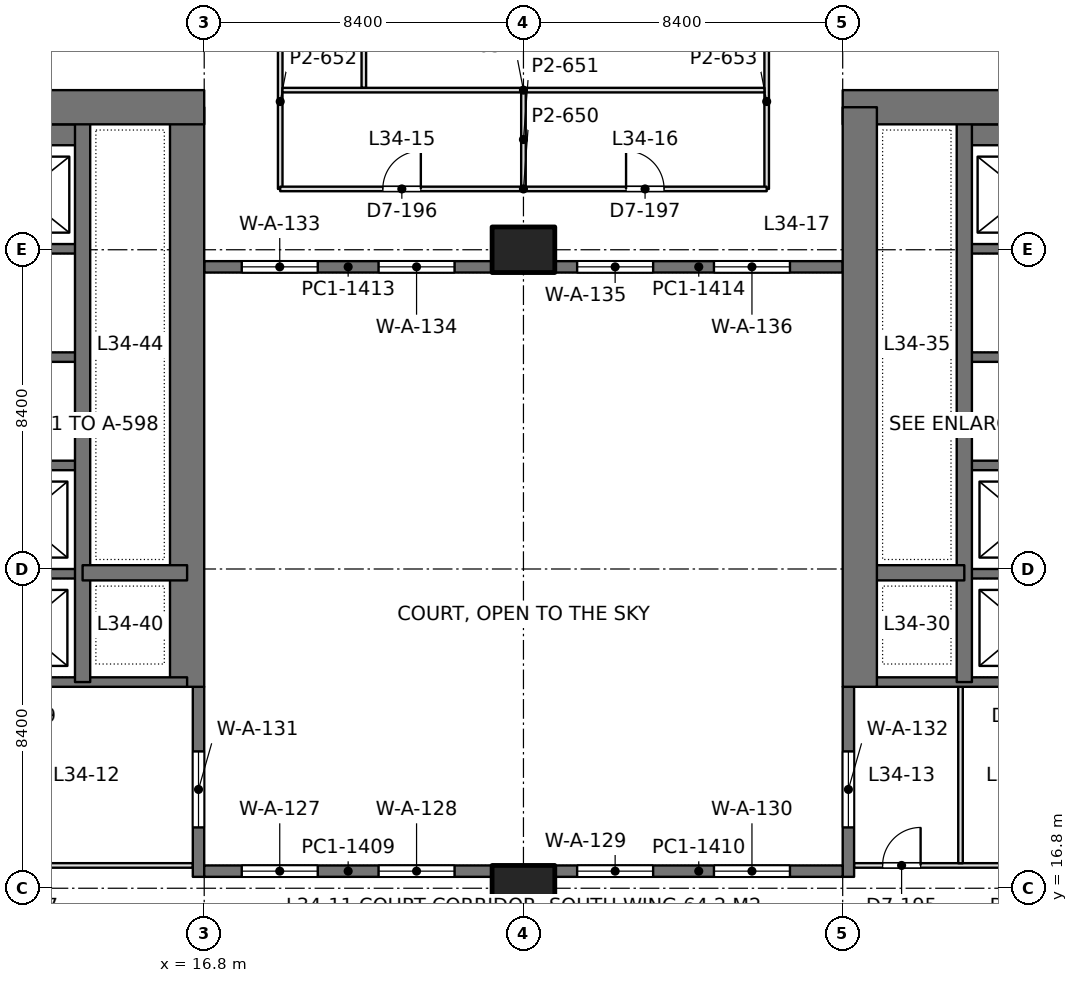
"""IFC4 building model, lengths in metres.
Left out: names, types, materials, properties, quantities, classifications, styles, units other than length and angle.
Written with IfcOpenShell. Run it as: python <this file> out.ifc"""

import sys

from ifc_helpers import new_model, si_unit, direction, frame, frame_2d, origin, origin_2d, place, context, subcontext, project, spatial, rectangle, extrude, element, fill, save


model = new_model("IFC4")
c1 = context("Model", 3, precision=1e-05, world=origin(), true_north=direction((0.0, 1.0)))
c2 = subcontext(c1, "Body", "Model", "MODEL_VIEW")
j1 = project(units=[si_unit("LENGTHUNIT", "METRE"), si_unit("PLANEANGLEUNIT", "RADIAN")], contexts=[c1])
p1 = place(None, origin())
s1 = spatial("IfcSite", under=j1, at=p1, CompositionType="ELEMENT")
p2 = place(p1, origin())
s2 = spatial("IfcBuilding", under=s1, at=p2, CompositionType="ELEMENT")
p3 = place(p2, frame((0.0, 0.0, 151.2)))
s3 = spatial("IfcBuildingStorey", under=s2, at=p3, CompositionType="ELEMENT", Elevation=151.2)
for number, where, z_axis, x_axis in (
    (1, (25.2, 16.8, 0.0), (0.0, 0.0, 1.0), (1.0, 0.0, 0.0)),
    (2, (25.2, 33.6, 0.0), (0.0, 0.0, 1.0), (1.0, 0.0, 0.0)),
):
    element("IfcColumn", number, at=place(p3, frame(where, z_axis=z_axis, x_axis=x_axis)), inside=s3, PredefinedType="COLUMN", context=c2, shape_type="SweptSolid", body=[
        extrude(rectangle(XDim=1.65, YDim=1.2, at=origin_2d()), origin(), (0.0, 0.0, 1.0), 4.2),
    ])
p4 = place(p3, frame((-1.2, 37.35, 0.0), z_axis=(0.0, 0.0, 1.0), x_axis=(1.0, 0.0, 0.0)))
e3 = element("IfcWall", 3, at=p4, inside=s3, PredefinedType="SHEAR", context=c2, shape_type="SweptSolid", body=[
    extrude(rectangle(XDim=18.0, YDim=0.9, at=frame_2d((9.0, 0.0))), origin(), (0.0, 0.0, 1.0), 4.2),
])
p5 = place(p4, frame((8.95, 0.0, 0.0)))
e4 = element("IfcOpeningElement", 4, at=p5, cuts=e3, PredefinedType="OPENING", context=c2, shape_type="SweptSolid", body=[
    extrude(rectangle(XDim=1.8, YDim=2.4, at=frame_2d((0.9, 1.2))), frame((0.0, 0.46, 0.0), z_axis=(0.0, -1.0, 0.0), x_axis=(1.0, 0.0, 0.0)), (0.0, 0.0, 1.0), 0.92),
])
p6 = place(p3, frame((16.35, 22.1, 0.0), z_axis=(0.0, 0.0, 1.0), x_axis=(0.0, 1.0, 0.0)))
e5 = element("IfcWall", 5, at=p6, inside=s3, PredefinedType="SHEAR", context=c2, shape_type="SweptSolid", body=[
    extrude(rectangle(XDim=15.25, YDim=0.9, at=frame_2d((7.625, 0.0))), origin(), (0.0, 0.0, 1.0), 4.2),
])
p7 = place(p3, frame((13.6, 22.225, 0.0), z_axis=(0.0, 0.0, 1.0), x_axis=(0.0, 1.0, 0.0)))
e6 = element("IfcWall", 6, at=p7, inside=s3, PredefinedType="SHEAR", context=c2, shape_type="SweptSolid", body=[
    extrude(rectangle(XDim=15.125, YDim=0.4, at=frame_2d((7.562, 0.0))), origin(), (0.0, 0.0, 1.0), 4.2),
])
p8 = place(p3, frame((13.6, 25.1, 0.0), z_axis=(0.0, 0.0, 1.0), x_axis=(1.0, 0.0, 0.0)))
e7 = element("IfcWall", 7, at=p8, inside=s3, PredefinedType="SHEAR", context=c2, shape_type="SweptSolid", body=[
    extrude(rectangle(XDim=2.75, YDim=0.4, at=frame_2d((1.375, 0.0))), origin(), (0.0, 0.0, 1.0), 4.2),
])
p9 = place(p3, frame((10.4, 22.225, 0.0), z_axis=(0.0, 0.0, 1.0), x_axis=(1.0, 0.0, 0.0)))
e8 = element("IfcWall", 8, at=p9, inside=s3, PredefinedType="SHEAR", context=c2, shape_type="SweptSolid", body=[
    extrude(rectangle(XDim=5.95, YDim=0.25, at=frame_2d((2.975, 0.0))), origin(), (0.0, 0.0, 1.0), 4.2),
])
for number, where, z_axis, x_axis in (
    (9, (10.4, 25.075, 0.0), (0.0, 0.0, 1.0), (1.0, 0.0, 0.0)),
    (10, (10.4, 27.925, 0.0), (0.0, 0.0, 1.0), (1.0, 0.0, 0.0)),
    (11, (10.4, 30.775, 0.0), (0.0, 0.0, 1.0), (1.0, 0.0, 0.0)),
    (12, (10.4, 33.625, 0.0), (0.0, 0.0, 1.0), (1.0, 0.0, 0.0)),
):
    element("IfcWall", number, at=place(p3, frame(where, z_axis=z_axis, x_axis=x_axis)), inside=s3, PredefinedType="SHEAR", context=c2, shape_type="SweptSolid", body=[
        extrude(rectangle(XDim=3.2, YDim=0.25, at=frame_2d((1.6, 0.0))), origin(), (0.0, 0.0, 1.0), 4.2),
    ])
p10 = place(p3, frame((10.4, 36.625, 0.0), z_axis=(0.0, 0.0, 1.0), x_axis=(1.0, 0.0, 0.0)))
e13 = element("IfcWall", 13, at=p10, inside=s3, PredefinedType="SHEAR", context=c2, shape_type="SweptSolid", body=[
    extrude(rectangle(XDim=3.2, YDim=0.55, at=frame_2d((1.6, 0.0))), origin(), (0.0, 0.0, 1.0), 4.2),
])
p11 = place(p3, frame((33.6, 37.35, 0.0), z_axis=(0.0, 0.0, 1.0), x_axis=(1.0, 0.0, 0.0)))
e14 = element("IfcWall", 14, at=p11, inside=s3, PredefinedType="SHEAR", context=c2, shape_type="SweptSolid", body=[
    extrude(rectangle(XDim=18.0, YDim=0.9, at=frame_2d((9.0, 0.0))), origin(), (0.0, 0.0, 1.0), 4.2),
])
p12 = place(p11, frame((7.25, 0.0, 0.0)))
e15 = element("IfcOpeningElement", 15, at=p12, cuts=e14, PredefinedType="OPENING", context=c2, shape_type="SweptSolid", body=[
    extrude(rectangle(XDim=1.8, YDim=2.4, at=frame_2d((0.9, 1.2))), frame((0.0, 0.46, 0.0), z_axis=(0.0, -1.0, 0.0), x_axis=(1.0, 0.0, 0.0)), (0.0, 0.0, 1.0), 0.92),
])
p13 = place(p3, frame((34.05, 22.1, 0.0), z_axis=(0.0, 0.0, 1.0), x_axis=(0.0, 1.0, 0.0)))
e16 = element("IfcWall", 16, at=p13, inside=s3, PredefinedType="SHEAR", context=c2, shape_type="SweptSolid", body=[
    extrude(rectangle(XDim=15.25, YDim=0.9, at=frame_2d((7.625, 0.0))), origin(), (0.0, 0.0, 1.0), 4.2),
])
p14 = place(p3, frame((36.8, 22.225, 0.0), z_axis=(0.0, 0.0, 1.0), x_axis=(0.0, 1.0, 0.0)))
e17 = element("IfcWall", 17, at=p14, inside=s3, PredefinedType="SHEAR", context=c2, shape_type="SweptSolid", body=[
    extrude(rectangle(XDim=15.125, YDim=0.4, at=frame_2d((7.562, 0.0))), origin(), (0.0, 0.0, 1.0), 4.2),
])
p15 = place(p3, frame((36.8, 25.1, 0.0), z_axis=(0.0, 0.0, 1.0), x_axis=(-1.0, 0.0, 0.0)))
e18 = element("IfcWall", 18, at=p15, inside=s3, PredefinedType="SHEAR", context=c2, shape_type="SweptSolid", body=[
    extrude(rectangle(XDim=2.75, YDim=0.4, at=frame_2d((1.375, 0.0))), origin(), (0.0, 0.0, 1.0), 4.2),
])
p16 = place(p3, frame((40.0, 22.225, 0.0), z_axis=(0.0, 0.0, 1.0), x_axis=(-1.0, 0.0, 0.0)))
e19 = element("IfcWall", 19, at=p16, inside=s3, PredefinedType="SHEAR", context=c2, shape_type="SweptSolid", body=[
    extrude(rectangle(XDim=5.95, YDim=0.25, at=frame_2d((2.975, 0.0))), origin(), (0.0, 0.0, 1.0), 4.2),
])
for number, where, z_axis, x_axis in (
    (20, (40.0, 25.075, 0.0), (0.0, 0.0, 1.0), (-1.0, 0.0, 0.0)),
    (21, (40.0, 27.925, 0.0), (0.0, 0.0, 1.0), (-1.0, 0.0, 0.0)),
    (22, (40.0, 30.775, 0.0), (0.0, 0.0, 1.0), (-1.0, 0.0, 0.0)),
    (23, (40.0, 33.625, 0.0), (0.0, 0.0, 1.0), (-1.0, 0.0, 0.0)),
):
    element("IfcWall", number, at=place(p3, frame(where, z_axis=z_axis, x_axis=x_axis)), inside=s3, PredefinedType="SHEAR", context=c2, shape_type="SweptSolid", body=[
        extrude(rectangle(XDim=3.2, YDim=0.25, at=frame_2d((1.6, 0.0))), origin(), (0.0, 0.0, 1.0), 4.2),
    ])
p17 = place(p3, frame((40.0, 36.625, 0.0), z_axis=(0.0, 0.0, 1.0), x_axis=(-1.0, 0.0, 0.0)))
e24 = element("IfcWall", 24, at=p17, inside=s3, PredefinedType="SHEAR", context=c2, shape_type="SweptSolid", body=[
    extrude(rectangle(XDim=3.2, YDim=0.55, at=frame_2d((1.6, 0.0))), origin(), (0.0, 0.0, 1.0), 4.2),
])
p18 = place(p3, frame((16.65, 17.1, 0.0), z_axis=(0.0, 0.0, 1.0), x_axis=(0.0, 1.0, 0.0)))
e25 = element("IfcWall", 25, at=p18, inside=s3, PredefinedType="SOLIDWALL", context=c2, shape_type="SweptSolid", body=[
    extrude(rectangle(XDim=5.0, YDim=0.3, at=frame_2d((2.5, 0.0))), origin(), (0.0, 0.0, 1.0), 4.05),
])
p19 = place(p18, frame((1.3, 0.0, 0.1)))
e26 = element("IfcOpeningElement", 26, at=p19, cuts=e25, PredefinedType="OPENING", context=c2, shape_type="SweptSolid", body=[
    extrude(rectangle(XDim=2.0, YDim=3.0, at=frame_2d((1.0, 1.5))), frame((0.0, 0.16, 0.0), z_axis=(0.0, -1.0, 0.0), x_axis=(1.0, 0.0, 0.0)), (0.0, 0.0, 1.0), 0.32),
])
p20 = place(p3, frame((33.75, 17.1, 0.0), z_axis=(0.0, 0.0, 1.0), x_axis=(0.0, 1.0, 0.0)))
e27 = element("IfcWall", 27, at=p20, inside=s3, PredefinedType="SOLIDWALL", context=c2, shape_type="SweptSolid", body=[
    extrude(rectangle(XDim=5.0, YDim=0.3, at=frame_2d((2.5, 0.0))), origin(), (0.0, 0.0, 1.0), 4.05),
])
p21 = place(p20, frame((1.3, 0.0, 0.1)))
e28 = element("IfcOpeningElement", 28, at=p21, cuts=e27, PredefinedType="OPENING", context=c2, shape_type="SweptSolid", body=[
    extrude(rectangle(XDim=2.0, YDim=3.0, at=frame_2d((1.0, 1.5))), frame((0.0, 0.16, 0.0), z_axis=(0.0, -1.0, 0.0), x_axis=(1.0, 0.0, 0.0)), (0.0, 0.0, 1.0), 0.32),
])
p22 = place(p3, frame((16.8, 17.25, 0.0), z_axis=(0.0, 0.0, 1.0), x_axis=(1.0, 0.0, 0.0)))
e29 = element("IfcWall", 29, at=p22, inside=s3, PredefinedType="SOLIDWALL", context=c2, shape_type="SweptSolid", body=[
    extrude(rectangle(XDim=7.575, YDim=0.3, at=frame_2d((3.788, 0.0))), origin(), (0.0, 0.0, 1.0), 4.05),
])
p23 = place(p22, frame((0.988, 0.0, 0.1)))
e30 = element("IfcOpeningElement", 30, at=p23, cuts=e29, PredefinedType="OPENING", context=c2, shape_type="SweptSolid", body=[
    extrude(rectangle(XDim=2.0, YDim=3.0, at=frame_2d((1.0, 1.5))), frame((0.0, 0.16, 0.0), z_axis=(0.0, -1.0, 0.0), x_axis=(1.0, 0.0, 0.0)), (0.0, 0.0, 1.0), 0.32),
])
p24 = place(p22, frame((4.587, 0.0, 0.1)))
e31 = element("IfcOpeningElement", 31, at=p24, cuts=e29, PredefinedType="OPENING", context=c2, shape_type="SweptSolid", body=[
    extrude(rectangle(XDim=2.0, YDim=3.0, at=frame_2d((1.0, 1.5))), frame((0.0, 0.16, 0.0), z_axis=(0.0, -1.0, 0.0), x_axis=(1.0, 0.0, 0.0)), (0.0, 0.0, 1.0), 0.32),
])
p25 = place(p3, frame((26.025, 17.25, 0.0), z_axis=(0.0, 0.0, 1.0), x_axis=(1.0, 0.0, 0.0)))
e32 = element("IfcWall", 32, at=p25, inside=s3, PredefinedType="SOLIDWALL", context=c2, shape_type="SweptSolid", body=[
    extrude(rectangle(XDim=7.575, YDim=0.3, at=frame_2d((3.788, 0.0))), origin(), (0.0, 0.0, 1.0), 4.05),
])
p26 = place(p25, frame((0.587, 0.0, 0.1)))
e33 = element("IfcOpeningElement", 33, at=p26, cuts=e32, PredefinedType="OPENING", context=c2, shape_type="SweptSolid", body=[
    extrude(rectangle(XDim=2.0, YDim=3.0, at=frame_2d((1.0, 1.5))), frame((0.0, 0.16, 0.0), z_axis=(0.0, -1.0, 0.0), x_axis=(1.0, 0.0, 0.0)), (0.0, 0.0, 1.0), 0.32),
])
p27 = place(p25, frame((4.188, 0.0, 0.1)))
e34 = element("IfcOpeningElement", 34, at=p27, cuts=e32, PredefinedType="OPENING", context=c2, shape_type="SweptSolid", body=[
    extrude(rectangle(XDim=2.0, YDim=3.0, at=frame_2d((1.0, 1.5))), frame((0.0, 0.16, 0.0), z_axis=(0.0, -1.0, 0.0), x_axis=(1.0, 0.0, 0.0)), (0.0, 0.0, 1.0), 0.32),
])
p28 = place(p3, frame((16.8, 33.15, 0.0), z_axis=(0.0, 0.0, 1.0), x_axis=(1.0, 0.0, 0.0)))
e35 = element("IfcWall", 35, at=p28, inside=s3, PredefinedType="SOLIDWALL", context=c2, shape_type="SweptSolid", body=[
    extrude(rectangle(XDim=7.575, YDim=0.3, at=frame_2d((3.788, 0.0))), origin(), (0.0, 0.0, 1.0), 4.05),
])
p29 = place(p28, frame((0.988, 0.0, 0.1)))
e36 = element("IfcOpeningElement", 36, at=p29, cuts=e35, PredefinedType="OPENING", context=c2, shape_type="SweptSolid", body=[
    extrude(rectangle(XDim=2.0, YDim=3.0, at=frame_2d((1.0, 1.5))), frame((0.0, 0.16, 0.0), z_axis=(0.0, -1.0, 0.0), x_axis=(1.0, 0.0, 0.0)), (0.0, 0.0, 1.0), 0.32),
])
p30 = place(p28, frame((4.587, 0.0, 0.1)))
e37 = element("IfcOpeningElement", 37, at=p30, cuts=e35, PredefinedType="OPENING", context=c2, shape_type="SweptSolid", body=[
    extrude(rectangle(XDim=2.0, YDim=3.0, at=frame_2d((1.0, 1.5))), frame((0.0, 0.16, 0.0), z_axis=(0.0, -1.0, 0.0), x_axis=(1.0, 0.0, 0.0)), (0.0, 0.0, 1.0), 0.32),
])
p31 = place(p3, frame((26.025, 33.15, 0.0), z_axis=(0.0, 0.0, 1.0), x_axis=(1.0, 0.0, 0.0)))
e38 = element("IfcWall", 38, at=p31, inside=s3, PredefinedType="SOLIDWALL", context=c2, shape_type="SweptSolid", body=[
    extrude(rectangle(XDim=7.575, YDim=0.3, at=frame_2d((3.788, 0.0))), origin(), (0.0, 0.0, 1.0), 4.05),
])
p32 = place(p31, frame((0.587, 0.0, 0.1)))
e39 = element("IfcOpeningElement", 39, at=p32, cuts=e38, PredefinedType="OPENING", context=c2, shape_type="SweptSolid", body=[
    extrude(rectangle(XDim=2.0, YDim=3.0, at=frame_2d((1.0, 1.5))), frame((0.0, 0.16, 0.0), z_axis=(0.0, -1.0, 0.0), x_axis=(1.0, 0.0, 0.0)), (0.0, 0.0, 1.0), 0.32),
])
p33 = place(p31, frame((4.188, 0.0, 0.1)))
e40 = element("IfcOpeningElement", 40, at=p33, cuts=e38, PredefinedType="OPENING", context=c2, shape_type="SweptSolid", body=[
    extrude(rectangle(XDim=2.0, YDim=3.0, at=frame_2d((1.0, 1.5))), frame((0.0, 0.16, 0.0), z_axis=(0.0, -1.0, 0.0), x_axis=(1.0, 0.0, 0.0)), (0.0, 0.0, 1.0), 0.32),
])
p34 = place(p3, frame((10.598, 17.4, 0.0), z_axis=(0.0, 0.0, 1.0), x_axis=(1.0, 0.0, 0.0)))
e41 = element("IfcWall", 41, at=p34, inside=s3, PredefinedType="PARTITIONING", context=c2, shape_type="SweptSolid", body=[
    extrude(rectangle(XDim=5.904, YDim=0.12, at=frame_2d((2.952, 0.0))), origin(), (0.0, 0.0, 1.0), 3.55),
])
p35 = place(p3, frame((33.898, 17.4, 0.0), z_axis=(0.0, 0.0, 1.0), x_axis=(1.0, 0.0, 0.0)))
e42 = element("IfcWall", 42, at=p35, inside=s3, PredefinedType="PARTITIONING", context=c2, shape_type="SweptSolid", body=[
    extrude(rectangle(XDim=5.904, YDim=0.12, at=frame_2d((2.952, 0.0))), origin(), (0.0, 0.0, 1.0), 3.55),
])
p36 = place(p35, frame((0.752, 0.0, 0.0)))
e43 = element("IfcOpeningElement", 43, at=p36, cuts=e42, PredefinedType="OPENING", context=c2, shape_type="SweptSolid", body=[
    extrude(rectangle(XDim=1.0, YDim=2.4, at=frame_2d((0.5, 1.2))), frame((0.0, 0.07, 0.0), z_axis=(0.0, -1.0, 0.0), x_axis=(1.0, 0.0, 0.0)), (0.0, 0.0, 1.0), 0.14),
])
p37 = place(p3, frame((36.7, 17.458, 0.0), z_axis=(0.0, 0.0, 1.0), x_axis=(0.0, 1.0, 0.0)))
e44 = element("IfcWall", 44, at=p37, inside=s3, PredefinedType="PARTITIONING", context=c2, shape_type="SweptSolid", body=[
    extrude(rectangle(XDim=4.644, YDim=0.12, at=frame_2d((2.322, 0.0))), origin(), (0.0, 0.0, 1.0), 3.6),
])
p38 = place(p3, frame((21.0, 37.858, 0.0), z_axis=(0.0, 0.0, 1.0), x_axis=(0.0, 1.0, 0.0)))
e45 = element("IfcWall", 45, at=p38, inside=s3, PredefinedType="PARTITIONING", context=c2, shape_type="SweptSolid", body=[
    extrude(rectangle(XDim=10.644, YDim=0.12, at=frame_2d((5.322, 0.0))), origin(), (0.0, 0.0, 1.0), 3.55),
])
for number, where, z_axis, x_axis in (
    (46, (18.8, 35.2, 0.0), (0.0, 0.0, 1.0), (0.0, 1.0, 0.0)),
    (47, (31.6, 35.2, 0.0), (0.0, 0.0, 1.0), (0.0, 1.0, 0.0)),
):
    element("IfcWall", number, at=place(p3, frame(where, z_axis=z_axis, x_axis=x_axis)), inside=s3, PredefinedType="PARTITIONING", context=c2, shape_type="SweptSolid", body=[
        extrude(rectangle(XDim=4.6, YDim=0.12, at=frame_2d((2.3, 0.0))), origin(), (0.0, 0.0, 1.0), 4.05),
    ])
p39 = place(p3, frame((25.2, 35.258, 0.0), z_axis=(0.0, 0.0, 1.0), x_axis=(0.0, 1.0, 0.0)))
e48 = element("IfcWall", 48, at=p39, inside=s3, PredefinedType="PARTITIONING", context=c2, shape_type="SweptSolid", body=[
    extrude(rectangle(XDim=2.484, YDim=0.12, at=frame_2d((1.242, 0.0))), origin(), (0.0, 0.0, 1.0), 3.55),
])
p40 = place(p3, frame((18.8, 35.2, 0.0), z_axis=(0.0, 0.0, 1.0), x_axis=(1.0, 0.0, 0.0)))
e49 = element("IfcWall", 49, at=p40, inside=s3, PredefinedType="PARTITIONING", context=c2, shape_type="SweptSolid", body=[
    extrude(rectangle(XDim=12.8, YDim=0.12, at=frame_2d((6.4, 0.0))), origin(), (0.0, 0.0, 1.0), 3.55),
])
p41 = place(p40, frame((2.7, 0.0, 0.0)))
e50 = element("IfcOpeningElement", 50, at=p41, cuts=e49, PredefinedType="OPENING", context=c2, shape_type="SweptSolid", body=[
    extrude(rectangle(XDim=1.0, YDim=2.4, at=frame_2d((0.5, 1.2))), frame((0.0, 0.07, 0.0), z_axis=(0.0, -1.0, 0.0), x_axis=(1.0, 0.0, 0.0)), (0.0, 0.0, 1.0), 0.14),
])
p42 = place(p40, frame((9.1, 0.0, 0.0)))
e51 = element("IfcOpeningElement", 51, at=p42, cuts=e49, PredefinedType="OPENING", context=c2, shape_type="SweptSolid", body=[
    extrude(rectangle(XDim=1.0, YDim=2.4, at=frame_2d((0.5, 1.2))), frame((0.0, 0.07, 0.0), z_axis=(0.0, -1.0, 0.0), x_axis=(1.0, 0.0, 0.0)), (0.0, 0.0, 1.0), 0.14),
])
p43 = place(p3, frame((18.858, 37.8, 0.0), z_axis=(0.0, 0.0, 1.0), x_axis=(1.0, 0.0, 0.0)))
e52 = element("IfcWall", 52, at=p43, inside=s3, PredefinedType="PARTITIONING", context=c2, shape_type="SweptSolid", body=[
    extrude(rectangle(XDim=12.684, YDim=0.12, at=frame_2d((6.342, 0.0))), origin(), (0.0, 0.0, 1.0), 3.55),
])
p44 = place(p19, origin())
e53 = element("IfcWindow", 53, at=p44, inside=s3, PartitioningType="SINGLE_PANEL", PredefinedType="WINDOW", context=c2, shape_type="SweptSolid", body=[
    extrude(rectangle(XDim=2.0, YDim=3.0, at=frame_2d((1.0, 1.5))), frame((0.0, 0.03, 0.0), z_axis=(0.0, -1.0, 0.0), x_axis=(1.0, 0.0, 0.0)), (0.0, 0.0, 1.0), 0.06),
])
fill(e26, e53)
p45 = place(p21, origin())
e54 = element("IfcWindow", 54, at=p45, inside=s3, PartitioningType="SINGLE_PANEL", PredefinedType="WINDOW", context=c2, shape_type="SweptSolid", body=[
    extrude(rectangle(XDim=2.0, YDim=3.0, at=frame_2d((1.0, 1.5))), frame((0.0, 0.03, 0.0), z_axis=(0.0, -1.0, 0.0), x_axis=(1.0, 0.0, 0.0)), (0.0, 0.0, 1.0), 0.06),
])
fill(e28, e54)
p46 = place(p23, origin())
e55 = element("IfcWindow", 55, at=p46, inside=s3, PartitioningType="SINGLE_PANEL", PredefinedType="WINDOW", context=c2, shape_type="SweptSolid", body=[
    extrude(rectangle(XDim=2.0, YDim=3.0, at=frame_2d((1.0, 1.5))), frame((0.0, 0.03, 0.0), z_axis=(0.0, -1.0, 0.0), x_axis=(1.0, 0.0, 0.0)), (0.0, 0.0, 1.0), 0.06),
])
fill(e30, e55)
p47 = place(p24, origin())
e56 = element("IfcWindow", 56, at=p47, inside=s3, PartitioningType="SINGLE_PANEL", PredefinedType="WINDOW", context=c2, shape_type="SweptSolid", body=[
    extrude(rectangle(XDim=2.0, YDim=3.0, at=frame_2d((1.0, 1.5))), frame((0.0, 0.03, 0.0), z_axis=(0.0, -1.0, 0.0), x_axis=(1.0, 0.0, 0.0)), (0.0, 0.0, 1.0), 0.06),
])
fill(e31, e56)
p48 = place(p26, origin())
e57 = element("IfcWindow", 57, at=p48, inside=s3, PartitioningType="SINGLE_PANEL", PredefinedType="WINDOW", context=c2, shape_type="SweptSolid", body=[
    extrude(rectangle(XDim=2.0, YDim=3.0, at=frame_2d((1.0, 1.5))), frame((0.0, 0.03, 0.0), z_axis=(0.0, -1.0, 0.0), x_axis=(1.0, 0.0, 0.0)), (0.0, 0.0, 1.0), 0.06),
])
fill(e33, e57)
p49 = place(p27, origin())
e58 = element("IfcWindow", 58, at=p49, inside=s3, PartitioningType="SINGLE_PANEL", PredefinedType="WINDOW", context=c2, shape_type="SweptSolid", body=[
    extrude(rectangle(XDim=2.0, YDim=3.0, at=frame_2d((1.0, 1.5))), frame((0.0, 0.03, 0.0), z_axis=(0.0, -1.0, 0.0), x_axis=(1.0, 0.0, 0.0)), (0.0, 0.0, 1.0), 0.06),
])
fill(e34, e58)
p50 = place(p29, origin())
e59 = element("IfcWindow", 59, at=p50, inside=s3, PartitioningType="SINGLE_PANEL", PredefinedType="WINDOW", context=c2, shape_type="SweptSolid", body=[
    extrude(rectangle(XDim=2.0, YDim=3.0, at=frame_2d((1.0, 1.5))), frame((0.0, 0.03, 0.0), z_axis=(0.0, -1.0, 0.0), x_axis=(1.0, 0.0, 0.0)), (0.0, 0.0, 1.0), 0.06),
])
fill(e36, e59)
p51 = place(p30, origin())
e60 = element("IfcWindow", 60, at=p51, inside=s3, PartitioningType="SINGLE_PANEL", PredefinedType="WINDOW", context=c2, shape_type="SweptSolid", body=[
    extrude(rectangle(XDim=2.0, YDim=3.0, at=frame_2d((1.0, 1.5))), frame((0.0, 0.03, 0.0), z_axis=(0.0, -1.0, 0.0), x_axis=(1.0, 0.0, 0.0)), (0.0, 0.0, 1.0), 0.06),
])
fill(e37, e60)
p52 = place(p32, origin())
e61 = element("IfcWindow", 61, at=p52, inside=s3, PartitioningType="SINGLE_PANEL", PredefinedType="WINDOW", context=c2, shape_type="SweptSolid", body=[
    extrude(rectangle(XDim=2.0, YDim=3.0, at=frame_2d((1.0, 1.5))), frame((0.0, 0.03, 0.0), z_axis=(0.0, -1.0, 0.0), x_axis=(1.0, 0.0, 0.0)), (0.0, 0.0, 1.0), 0.06),
])
fill(e39, e61)
p53 = place(p33, origin())
e62 = element("IfcWindow", 62, at=p53, inside=s3, PartitioningType="SINGLE_PANEL", PredefinedType="WINDOW", context=c2, shape_type="SweptSolid", body=[
    extrude(rectangle(XDim=2.0, YDim=3.0, at=frame_2d((1.0, 1.5))), frame((0.0, 0.03, 0.0), z_axis=(0.0, -1.0, 0.0), x_axis=(1.0, 0.0, 0.0)), (0.0, 0.0, 1.0), 0.06),
])
fill(e40, e62)
p54 = place(p36, origin())
e63 = element("IfcDoor", 63, at=p54, inside=s3, OperationType="SINGLE_SWING_RIGHT", PredefinedType="DOOR", context=c2, shape_type="SweptSolid", body=[
    extrude(rectangle(XDim=1.0, YDim=2.4, at=frame_2d((0.5, 1.2))), frame((0.0, 0.025, 0.0), z_axis=(0.0, -1.0, 0.0), x_axis=(1.0, 0.0, 0.0)), (0.0, 0.0, 1.0), 0.05),
])
fill(e43, e63)
p55 = place(p41, origin())
e64 = element("IfcDoor", 64, at=p55, inside=s3, OperationType="SINGLE_SWING_RIGHT", PredefinedType="DOOR", context=c2, shape_type="SweptSolid", body=[
    extrude(rectangle(XDim=1.0, YDim=2.4, at=frame_2d((0.5, 1.2))), frame((0.0, 0.025, 0.0), z_axis=(0.0, -1.0, 0.0), x_axis=(1.0, 0.0, 0.0)), (0.0, 0.0, 1.0), 0.05),
])
fill(e50, e64)
p56 = place(p42, origin())
e65 = element("IfcDoor", 65, at=p56, inside=s3, OperationType="SINGLE_SWING_LEFT", PredefinedType="DOOR", context=c2, shape_type="SweptSolid", body=[
    extrude(rectangle(XDim=1.0, YDim=2.4, at=frame_2d((0.5, 1.2))), frame((0.0, 0.025, 0.0), z_axis=(0.0, -1.0, 0.0), x_axis=(1.0, 0.0, 0.0)), (0.0, 0.0, 1.0), 0.05),
])
fill(e51, e65)
save(model, sys.argv[1])
